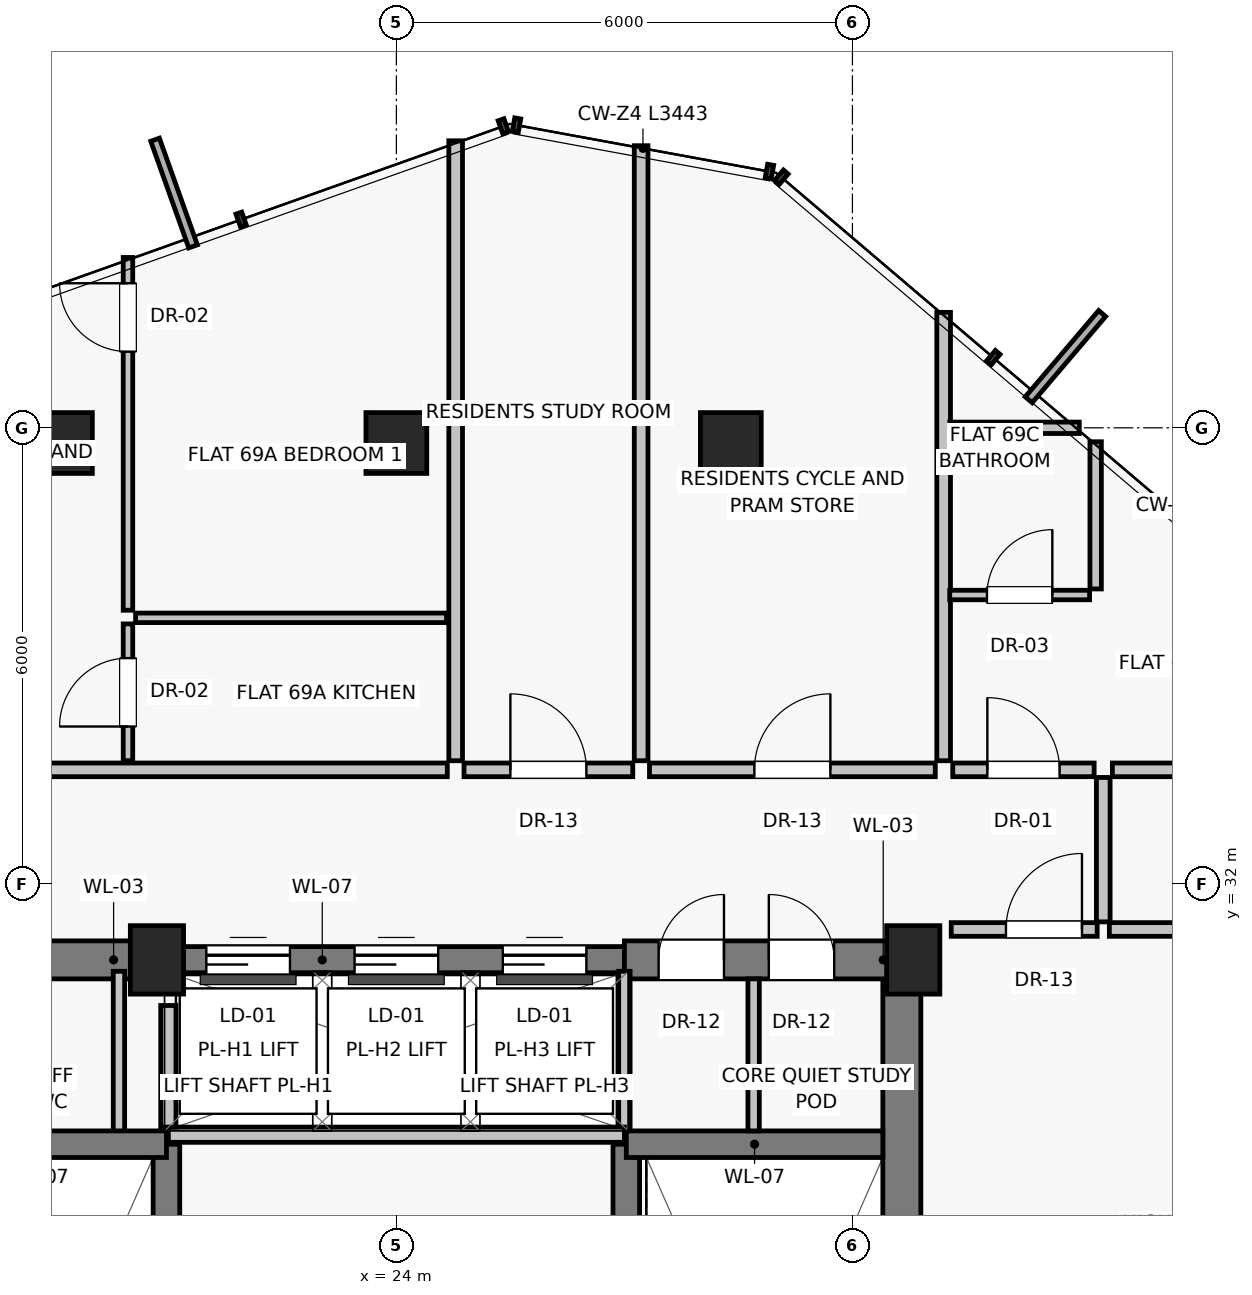
"""IFC4 building model, lengths in metres.
Left out: names, types, materials, properties, quantities, classifications, styles, units other than length and angle.
Written with IfcOpenShell. Run it as: python <this file> out.ifc"""

import sys

from ifc_helpers import new_model, si_unit, direction, frame, frame_2d, origin, origin_2d, place, context, subcontext, project, spatial, rectangle, extrude, source, transform, mapped, element, fill, save


model = new_model("IFC4")
c1 = context("Model", 3, precision=1e-05, world=origin(), true_north=direction((0.0, 1.0)))
c2 = subcontext(c1, "Body", "Model", "MODEL_VIEW")
j1 = project(units=[si_unit("LENGTHUNIT", "METRE"), si_unit("PLANEANGLEUNIT", "RADIAN")], contexts=[c1])
p1 = place(None, origin())
s1 = spatial("IfcSite", under=j1, at=p1, CompositionType="ELEMENT")
p2 = place(p1, origin())
s2 = spatial("IfcBuilding", under=s1, at=p2, CompositionType="ELEMENT")
p3 = place(p2, frame((0.0, 0.0, 244.75)))
s3 = spatial("IfcBuildingStorey", under=s2, at=p3, CompositionType="ELEMENT", Elevation=244.75)
for number, where, z_axis, x_axis in (
    (1, (20.85, 31.0, 0.0), (0.0, 0.0, 1.0), (1.0, 0.0, 0.0)),
    (2, (30.8, 31.0, 0.0), (0.0, 0.0, 1.0), (1.0, 0.0, 0.0)),
):
    element("IfcColumn", number, at=place(p3, frame(where, z_axis=z_axis, x_axis=x_axis)), inside=s3, PredefinedType="PILASTER", context=c2, shape_type="SweptSolid", body=[
        extrude(rectangle(XDim=0.7, YDim=0.9, at=origin_2d()), origin(), (0.0, 0.0, 1.0), 3.25),
    ])
for number, where, z_axis, x_axis in (
    (3, (28.4, 37.8, 0.0), (0.0, 0.0, 1.0), (1.0, 0.0, 0.0)),
    (4, (24.0, 37.8, 0.0), (0.0, 0.0, 1.0), (1.0, 0.0, 0.0)),
    (5, (19.6, 37.8, 0.0), (0.0, 0.0, 1.0), (1.0, 0.0, 0.0)),
):
    element("IfcColumn", number, at=place(p3, frame(where, z_axis=z_axis, x_axis=x_axis)), inside=s3, PredefinedType="COLUMN", context=c2, shape_type="SweptSolid", body=[
        extrude(rectangle(XDim=0.8, YDim=0.8, at=origin_2d()), origin(), (0.0, 0.0, 1.0), 3.25),
    ])
p4 = place(p3, frame((30.65, 16.8, 0.0), z_axis=(0.0, 0.0, 1.0), x_axis=(0.0, 1.0, 0.0)))
e6 = element("IfcWall", 6, at=p4, inside=s3, PredefinedType="SHEAR", context=c2, shape_type="SweptSolid", body=[
    extrude(rectangle(XDim=14.2, YDim=0.5, at=frame_2d((7.1, 0.0))), origin(), (0.0, 0.0, 1.0), 3.015),
])
p5 = place(p3, frame((17.2, 31.0, 0.0), z_axis=(0.0, 0.0, 1.0), x_axis=(1.0, 0.0, 0.0)))
e7 = element("IfcWall", 7, at=p5, inside=s3, PredefinedType="SHEAR", context=c2, shape_type="SweptSolid", body=[
    extrude(rectangle(XDim=3.8, YDim=0.5, at=frame_2d((1.9, 0.0))), origin(), (0.0, 0.0, 1.0), 3.015),
])
p6 = place(p5, frame((1.25, 0.0, 0.0)))
e8 = element("IfcOpeningElement", 8, at=p6, cuts=e7, PredefinedType="OPENING", context=c2, shape_type="SweptSolid", body=[
    extrude(rectangle(XDim=0.86, YDim=2.01, at=frame_2d((0.43, 1.005))), frame((0.0, 0.26, 0.0), z_axis=(0.0, -1.0, 0.0), x_axis=(1.0, 0.0, 0.0)), (0.0, 0.0, 1.0), 0.52),
])
p7 = place(p3, frame((21.0, 31.0, 0.0), z_axis=(0.0, 0.0, 1.0), x_axis=(1.0, 0.0, 0.0)))
e9 = element("IfcWall", 9, at=p7, inside=s3, PredefinedType="SHEAR", context=c2, shape_type="SweptSolid", body=[
    extrude(rectangle(XDim=6.0, YDim=0.35, at=frame_2d((3.0, 0.0))), origin(), (0.0, 0.0, 1.0), 3.015),
])
p8 = place(p7, frame((0.5, 0.0, 0.0)))
e10 = element("IfcOpeningElement", 10, at=p8, cuts=e9, PredefinedType="OPENING", context=c2, shape_type="SweptSolid", body=[
    extrude(rectangle(XDim=1.1, YDim=2.08, at=frame_2d((0.55, 1.04))), frame((0.0, 0.185, 0.0), z_axis=(0.0, -1.0, 0.0), x_axis=(1.0, 0.0, 0.0)), (0.0, 0.0, 1.0), 0.37),
])
p9 = place(p7, frame((2.45, 0.0, 0.0)))
e11 = element("IfcOpeningElement", 11, at=p9, cuts=e9, PredefinedType="OPENING", context=c2, shape_type="SweptSolid", body=[
    extrude(rectangle(XDim=1.1, YDim=2.08, at=frame_2d((0.55, 1.04))), frame((0.0, 0.185, 0.0), z_axis=(0.0, -1.0, 0.0), x_axis=(1.0, 0.0, 0.0)), (0.0, 0.0, 1.0), 0.37),
])
p10 = place(p7, frame((4.4, 0.0, 0.0)))
e12 = element("IfcOpeningElement", 12, at=p10, cuts=e9, PredefinedType="OPENING", context=c2, shape_type="SweptSolid", body=[
    extrude(rectangle(XDim=1.1, YDim=2.08, at=frame_2d((0.55, 1.04))), frame((0.0, 0.185, 0.0), z_axis=(0.0, -1.0, 0.0), x_axis=(1.0, 0.0, 0.0)), (0.0, 0.0, 1.0), 0.37),
])
p11 = place(p3, frame((27.0, 31.0, 0.0), z_axis=(0.0, 0.0, 1.0), x_axis=(1.0, 0.0, 0.0)))
e13 = element("IfcWall", 13, at=p11, inside=s3, PredefinedType="SHEAR", context=c2, shape_type="SweptSolid", body=[
    extrude(rectangle(XDim=3.8, YDim=0.5, at=frame_2d((1.9, 0.0))), origin(), (0.0, 0.0, 1.0), 3.015),
])
p12 = place(p11, frame((0.45, 0.0, 0.0)))
e14 = element("IfcOpeningElement", 14, at=p12, cuts=e13, PredefinedType="OPENING", context=c2, shape_type="SweptSolid", body=[
    extrude(rectangle(XDim=0.86, YDim=2.01, at=frame_2d((0.43, 1.005))), frame((0.0, 0.26, 0.0), z_axis=(0.0, -1.0, 0.0), x_axis=(1.0, 0.0, 0.0)), (0.0, 0.0, 1.0), 0.52),
])
p13 = place(p11, frame((1.9, 0.0, 0.0)))
e15 = element("IfcOpeningElement", 15, at=p13, cuts=e13, PredefinedType="OPENING", context=c2, shape_type="SweptSolid", body=[
    extrude(rectangle(XDim=0.86, YDim=2.01, at=frame_2d((0.43, 1.005))), frame((0.0, 0.26, 0.0), z_axis=(0.0, -1.0, 0.0), x_axis=(1.0, 0.0, 0.0)), (0.0, 0.0, 1.0), 0.52),
])
for number, where, z_axis, x_axis in (
    (16, (20.35, 28.65, 0.0), (0.0, 0.0, 1.0), (0.0, 1.0, 0.0)),
    (17, (27.0, 28.65, 0.0), (0.0, 0.0, 1.0), (0.0, 1.0, 0.0)),
):
    element("IfcWall", number, at=place(p3, frame(where, z_axis=z_axis, x_axis=x_axis)), inside=s3, PredefinedType="PARTITIONING", context=c2, shape_type="SweptSolid", body=[
        extrude(rectangle(XDim=2.2, YDim=0.15, at=frame_2d((1.1, 0.0))), origin(), (0.0, 0.0, 1.0), 3.015),
    ])
for number, where, z_axis, x_axis in (
    (18, (20.975, 19.8, 0.0), (0.0, 0.0, 1.0), (0.0, 1.0, 0.0)),
    (19, (27.025, 19.8, 0.0), (0.0, 0.0, 1.0), (0.0, 1.0, 0.0)),
):
    element("IfcWall", number, at=place(p3, frame(where, z_axis=z_axis, x_axis=x_axis)), inside=s3, PredefinedType="SHEAR", context=c2, shape_type="SweptSolid", body=[
        extrude(rectangle(XDim=8.775, YDim=0.35, at=frame_2d((4.387, 0.0))), origin(), (0.0, 0.0, 1.0), 3.015),
    ])
for number, where, z_axis, x_axis in (
    (20, (17.6, 28.575, 0.0), (0.0, 0.0, 1.0), (1.0, 0.0, 0.0)),
    (21, (27.025, 28.575, 0.0), (0.0, 0.0, 1.0), (1.0, 0.0, 0.0)),
):
    element("IfcWall", number, at=place(p3, frame(where, z_axis=z_axis, x_axis=x_axis)), inside=s3, PredefinedType="SHEAR", context=c2, shape_type="SweptSolid", body=[
        extrude(rectangle(XDim=3.375, YDim=0.35, at=frame_2d((1.688, 0.0))), origin(), (0.0, 0.0, 1.0), 3.015),
    ])
p14 = place(p3, frame((21.0, 28.7, 0.0), z_axis=(0.0, 0.0, 1.0), x_axis=(1.0, 0.0, 0.0)))
e22 = element("IfcWall", 22, at=p14, inside=s3, PredefinedType="SOLIDWALL", context=c2, shape_type="SweptSolid", body=[
    extrude(rectangle(XDim=6.0, YDim=0.2, at=frame_2d((3.0, 0.0))), origin(), (0.0, 0.0, 1.0), 3.015),
])
p15 = place(p3, frame((21.0, 28.8, 0.0), z_axis=(0.0, 0.0, 1.0), x_axis=(0.0, 1.0, 0.0)))
e23 = element("IfcWall", 23, at=p15, inside=s3, PredefinedType="SOLIDWALL", context=c2, shape_type="SweptSolid", body=[
    extrude(rectangle(XDim=1.6, YDim=0.2, at=frame_2d((0.8, 0.0))), origin(), (0.0, 0.0, 1.0), 3.015),
])
p16 = place(p3, frame((28.7, 28.75, 0.0), z_axis=(0.0, 0.0, 1.0), x_axis=(0.0, 1.0, 0.0)))
e24 = element("IfcWall", 24, at=p16, inside=s3, PredefinedType="PARTITIONING", context=c2, shape_type="SweptSolid", body=[
    extrude(rectangle(XDim=2.0, YDim=0.15, at=frame_2d((1.0, 0.0))), origin(), (0.0, 0.0, 1.0), 3.015),
])
p17 = place(p3, frame((31.2, 33.62, 0.0), z_axis=(0.0, 0.0, 1.0), x_axis=(0.0, 1.0, 0.0)))
e25 = element("IfcWall", 25, at=p17, inside=s3, PredefinedType="PARTITIONING", context=c2, shape_type="SweptSolid", body=[
    extrude(rectangle(XDim=5.898, YDim=0.18, at=frame_2d((2.949, 0.0))), origin(), (0.0, 0.0, 1.0), 3.015),
])
p18 = place(p3, frame((15.31, 33.5, 0.0), z_axis=(0.0, 0.0, 1.0), x_axis=(1.0, 0.0, 0.0)))
e26 = element("IfcWall", 26, at=p18, inside=s3, PredefinedType="PARTITIONING", context=c2, shape_type="SweptSolid", body=[
    extrude(rectangle(XDim=9.36, YDim=0.18, at=frame_2d((4.68, 0.0))), origin(), (0.0, 0.0, 1.0), 3.015),
])
p19 = place(p18, frame((3.175, 0.0, 0.0)))
e27 = element("IfcOpeningElement", 27, at=p19, cuts=e26, PredefinedType="OPENING", context=c2, shape_type="SweptSolid", body=[
    extrude(rectangle(XDim=0.95, YDim=2.02, at=frame_2d((0.475, 1.01))), frame((0.0, 0.1, 0.0), z_axis=(0.0, -1.0, 0.0), x_axis=(1.0, 0.0, 0.0)), (0.0, 0.0, 1.0), 0.2),
])
p20 = place(p3, frame((20.469, 33.62, 0.0), z_axis=(0.0, 0.0, 1.0), x_axis=(0.0, 1.0, 0.0)))
e28 = element("IfcWall", 28, at=p20, inside=s3, PredefinedType="PARTITIONING", context=c2, shape_type="SweptSolid", body=[
    extrude(rectangle(XDim=1.8, YDim=0.125, at=frame_2d((0.9, 0.0))), origin(), (0.0, 0.0, 1.0), 2.543),
])
p21 = place(p20, frame((0.45, 0.0, 0.0)))
e29 = element("IfcOpeningElement", 29, at=p21, cuts=e28, PredefinedType="OPENING", context=c2, shape_type="SweptSolid", body=[
    extrude(rectangle(XDim=0.9, YDim=2.01, at=frame_2d((0.45, 1.005))), frame((0.0, 0.073, 0.0), z_axis=(0.0, -1.0, 0.0), x_axis=(1.0, 0.0, 0.0)), (0.0, 0.0, 1.0), 0.145),
])
p22 = place(p3, frame((20.569, 35.5, 0.0), z_axis=(0.0, 0.0, 1.0), x_axis=(1.0, 0.0, 0.0)))
e30 = element("IfcWall", 30, at=p22, inside=s3, PredefinedType="PARTITIONING", context=c2, shape_type="SweptSolid", body=[
    extrude(rectangle(XDim=4.091, YDim=0.125, at=frame_2d((2.045, 0.0))), origin(), (0.0, 0.0, 1.0), 3.015),
])
p23 = place(p3, frame((20.469, 35.6, 0.0), z_axis=(0.0, 0.0, 1.0), x_axis=(0.0, 1.0, 0.0)))
e31 = element("IfcWall", 31, at=p23, inside=s3, PredefinedType="PARTITIONING", context=c2, shape_type="SweptSolid", body=[
    extrude(rectangle(XDim=4.641, YDim=0.125, at=frame_2d((2.32, 0.0))), origin(), (0.0, 0.0, 1.0), 2.543),
])
p24 = place(p23, frame((3.402, 0.0, 0.0)))
e32 = element("IfcOpeningElement", 32, at=p24, cuts=e31, PredefinedType="OPENING", context=c2, shape_type="SweptSolid", body=[
    extrude(rectangle(XDim=0.9, YDim=2.01, at=frame_2d((0.45, 1.005))), frame((0.0, 0.073, 0.0), z_axis=(0.0, -1.0, 0.0), x_axis=(1.0, 0.0, 0.0)), (0.0, 0.0, 1.0), 0.145),
])
p25 = place(p3, frame((24.78, 33.62, 0.0), z_axis=(0.0, 0.0, 1.0), x_axis=(0.0, 1.0, 0.0)))
e33 = element("IfcWall", 33, at=p25, inside=s3, PredefinedType="PARTITIONING", context=c2, shape_type="SweptSolid", body=[
    extrude(rectangle(XDim=8.156, YDim=0.18, at=frame_2d((4.078, 0.0))), origin(), (0.0, 0.0, 1.0), 3.015),
])
p26 = place(p3, frame((24.89, 33.5, 0.0), z_axis=(0.0, 0.0, 1.0), x_axis=(1.0, 0.0, 0.0)))
e34 = element("IfcWall", 34, at=p26, inside=s3, PredefinedType="PARTITIONING", context=c2, shape_type="SweptSolid", body=[
    extrude(rectangle(XDim=2.22, YDim=0.18, at=frame_2d((1.11, 0.0))), origin(), (0.0, 0.0, 1.0), 3.015),
])
p27 = place(p26, frame((0.61, 0.0, 0.0)))
e35 = element("IfcOpeningElement", 35, at=p27, cuts=e34, PredefinedType="OPENING", context=c2, shape_type="SweptSolid", body=[
    extrude(rectangle(XDim=1.0, YDim=2.01, at=frame_2d((0.5, 1.005))), frame((0.0, 0.1, 0.0), z_axis=(0.0, -1.0, 0.0), x_axis=(1.0, 0.0, 0.0)), (0.0, 0.0, 1.0), 0.2),
])
p28 = place(p3, frame((27.33, 33.5, 0.0), z_axis=(0.0, 0.0, 1.0), x_axis=(1.0, 0.0, 0.0)))
e36 = element("IfcWall", 36, at=p28, inside=s3, PredefinedType="PARTITIONING", context=c2, shape_type="SweptSolid", body=[
    extrude(rectangle(XDim=3.76, YDim=0.18, at=frame_2d((1.88, 0.0))), origin(), (0.0, 0.0, 1.0), 3.015),
])
p29 = place(p28, frame((1.38, 0.0, 0.0)))
e37 = element("IfcOpeningElement", 37, at=p29, cuts=e36, PredefinedType="OPENING", context=c2, shape_type="SweptSolid", body=[
    extrude(rectangle(XDim=1.0, YDim=2.01, at=frame_2d((0.5, 1.005))), frame((0.0, 0.1, 0.0), z_axis=(0.0, -1.0, 0.0), x_axis=(1.0, 0.0, 0.0)), (0.0, 0.0, 1.0), 0.2),
])
p30 = place(p3, frame((27.22, 33.62, 0.0), z_axis=(0.0, 0.0, 1.0), x_axis=(0.0, 1.0, 0.0)))
e38 = element("IfcWall", 38, at=p30, inside=s3, PredefinedType="PARTITIONING", context=c2, shape_type="SweptSolid", body=[
    extrude(rectangle(XDim=8.091, YDim=0.18, at=frame_2d((4.045, 0.0))), origin(), (0.0, 0.0, 1.0), 3.015),
])
p31 = place(p3, frame((33.3, 31.5, 0.0), z_axis=(0.0, 0.0, 1.0), x_axis=(0.0, 1.0, 0.0)))
e39 = element("IfcWall", 39, at=p31, inside=s3, PredefinedType="PARTITIONING", context=c2, shape_type="SweptSolid", body=[
    extrude(rectangle(XDim=1.9, YDim=0.18, at=frame_2d((0.95, 0.0))), origin(), (0.0, 0.0, 1.0), 3.015),
])
p32 = place(p3, frame((31.3, 31.4, 0.0), z_axis=(0.0, 0.0, 1.0), x_axis=(1.0, 0.0, 0.0)))
e40 = element("IfcWall", 40, at=p32, inside=s3, PredefinedType="PARTITIONING", context=c2, shape_type="SweptSolid", body=[
    extrude(rectangle(XDim=1.92, YDim=0.18, at=frame_2d((0.96, 0.0))), origin(), (0.0, 0.0, 1.0), 3.015),
])
p33 = place(p32, frame((0.72, 0.0, 0.0)))
e41 = element("IfcOpeningElement", 41, at=p33, cuts=e40, PredefinedType="OPENING", context=c2, shape_type="SweptSolid", body=[
    extrude(rectangle(XDim=1.0, YDim=2.01, at=frame_2d((0.5, 1.005))), frame((0.0, 0.1, 0.0), z_axis=(0.0, -1.0, 0.0), x_axis=(1.0, 0.0, 0.0)), (0.0, 0.0, 1.0), 0.2),
])
p34 = place(p3, frame((33.38, 31.4, 0.0), z_axis=(0.0, 0.0, 1.0), x_axis=(1.0, 0.0, 0.0)))
e42 = element("IfcWall", 42, at=p34, inside=s3, PredefinedType="PARTITIONING", context=c2, shape_type="SweptSolid", body=[
    extrude(rectangle(XDim=7.094, YDim=0.18, at=frame_2d((3.547, 0.0))), origin(), (0.0, 0.0, 1.0), 3.015),
])
p35 = place(p3, frame((33.42, 33.5, 0.0), z_axis=(0.0, 0.0, 1.0), x_axis=(1.0, 0.0, 0.0)))
e43 = element("IfcWall", 43, at=p35, inside=s3, PredefinedType="PARTITIONING", context=c2, shape_type="SweptSolid", body=[
    extrude(rectangle(XDim=4.852, YDim=0.18, at=frame_2d((2.426, 0.0))), origin(), (0.0, 0.0, 1.0), 3.015),
])
p36 = place(p3, frame((31.32, 33.5, 0.0), z_axis=(0.0, 0.0, 1.0), x_axis=(1.0, 0.0, 0.0)))
e44 = element("IfcWall", 44, at=p36, inside=s3, PredefinedType="PARTITIONING", context=c2, shape_type="SweptSolid", body=[
    extrude(rectangle(XDim=1.86, YDim=0.18, at=frame_2d((0.93, 0.0))), origin(), (0.0, 0.0, 1.0), 3.015),
])
p37 = place(p36, frame((0.455, 0.0, 0.0)))
e45 = element("IfcOpeningElement", 45, at=p37, cuts=e44, PredefinedType="OPENING", context=c2, shape_type="SweptSolid", body=[
    extrude(rectangle(XDim=0.95, YDim=2.02, at=frame_2d((0.475, 1.01))), frame((0.0, 0.1, 0.0), z_axis=(0.0, -1.0, 0.0), x_axis=(1.0, 0.0, 0.0)), (0.0, 0.0, 1.0), 0.2),
])
p38 = place(p3, frame((31.28, 35.8, 0.0), z_axis=(0.0, 0.0, 1.0), x_axis=(1.0, 0.0, 0.0)))
e46 = element("IfcWall", 46, at=p38, inside=s3, PredefinedType="PARTITIONING", context=c2, shape_type="SweptSolid", body=[
    extrude(rectangle(XDim=1.84, YDim=0.125, at=frame_2d((0.92, 0.0))), origin(), (0.0, 0.0, 1.0), 3.015),
])
p39 = place(p38, frame((0.49, 0.0, 0.0)))
e47 = element("IfcOpeningElement", 47, at=p39, cuts=e46, PredefinedType="OPENING", context=c2, shape_type="SweptSolid", body=[
    extrude(rectangle(XDim=0.86, YDim=2.01, at=frame_2d((0.43, 1.005))), frame((0.0, 0.073, 0.0), z_axis=(0.0, -1.0, 0.0), x_axis=(1.0, 0.0, 0.0)), (0.0, 0.0, 1.0), 0.145),
])
p40 = place(p3, frame((31.28, 38.0, 0.0), z_axis=(0.0, 0.0, 1.0), x_axis=(1.0, 0.0, 0.0)))
e48 = element("IfcWall", 48, at=p40, inside=s3, PredefinedType="PARTITIONING", context=c2, shape_type="SweptSolid", body=[
    extrude(rectangle(XDim=1.704, YDim=0.15, at=frame_2d((0.852, 0.0))), origin(), (0.0, 0.0, 1.0), 3.015),
])
p41 = place(p3, frame((33.2, 35.88, 0.0), z_axis=(0.0, 0.0, 1.0), x_axis=(0.0, 1.0, 0.0)))
e49 = element("IfcWall", 49, at=p41, inside=s3, PredefinedType="PARTITIONING", context=c2, shape_type="SweptSolid", body=[
    extrude(rectangle(XDim=1.937, YDim=0.15, at=frame_2d((0.968, 0.0))), origin(), (0.0, 0.0, 1.0), 3.015),
])
m1 = source(origin(), c2, "Body", "SweptSolid", [
    extrude(rectangle(XDim=1.1, YDim=2.08, at=frame_2d((0.55, 1.04))), frame((0.0, 0.025, 0.0), z_axis=(0.0, -1.0, 0.0), x_axis=(1.0, 0.0, 0.0)), (0.0, 0.0, 1.0), 0.05),
])
p42 = place(p8, origin())
e50 = element("IfcDoor", 50, at=p42, inside=s3, OperationType="SLIDING_TO_LEFT", PredefinedType="DOOR", context=c2, shape_type="MappedRepresentation", body=[
    mapped(m1, transform((0.0, 0.0, 0.0), scale=1.0)),
])
fill(e10, e50)
p43 = place(p9, origin())
e51 = element("IfcDoor", 51, at=p43, inside=s3, OperationType="SLIDING_TO_LEFT", PredefinedType="DOOR", context=c2, shape_type="MappedRepresentation", body=[
    mapped(m1, transform((0.0, 0.0, 0.0), scale=1.0)),
])
fill(e11, e51)
p44 = place(p10, origin())
e52 = element("IfcDoor", 52, at=p44, inside=s3, OperationType="SLIDING_TO_LEFT", PredefinedType="DOOR", context=c2, shape_type="MappedRepresentation", body=[
    mapped(m1, transform((0.0, 0.0, 0.0), scale=1.0)),
])
fill(e12, e52)
m2 = source(origin(), c2, "Body", "SweptSolid", [
    extrude(rectangle(XDim=0.86, YDim=2.01, at=frame_2d((0.43, 1.005))), frame((0.0, 0.025, 0.0), z_axis=(0.0, -1.0, 0.0), x_axis=(1.0, 0.0, 0.0)), (0.0, 0.0, 1.0), 0.05),
])
p45 = place(p12, origin())
e53 = element("IfcDoor", 53, at=p45, inside=s3, OperationType="SINGLE_SWING_RIGHT", PredefinedType="DOOR", context=c2, shape_type="MappedRepresentation", body=[
    mapped(m2, transform((0.0, 0.0, 0.0), scale=1.0)),
])
fill(e14, e53)
p46 = place(p13, origin())
e54 = element("IfcDoor", 54, at=p46, inside=s3, OperationType="SINGLE_SWING_LEFT", PredefinedType="DOOR", context=c2, shape_type="MappedRepresentation", body=[
    mapped(m2, transform((0.0, 0.0, 0.0), scale=1.0)),
])
fill(e15, e54)
m3 = source(origin(), c2, "Body", "SweptSolid", [
    extrude(rectangle(XDim=0.9, YDim=2.01, at=frame_2d((0.45, 1.005))), frame((0.0, 0.025, 0.0), z_axis=(0.0, -1.0, 0.0), x_axis=(1.0, 0.0, 0.0)), (0.0, 0.0, 1.0), 0.05),
])
p47 = place(p21, origin())
e55 = element("IfcDoor", 55, at=p47, inside=s3, OperationType="SINGLE_SWING_LEFT", PredefinedType="DOOR", context=c2, shape_type="MappedRepresentation", body=[
    mapped(m3, transform((0.0, 0.0, 0.0), scale=1.0)),
])
fill(e29, e55)
p48 = place(p24, origin())
e56 = element("IfcDoor", 56, at=p48, inside=s3, OperationType="SINGLE_SWING_RIGHT", PredefinedType="DOOR", context=c2, shape_type="MappedRepresentation", body=[
    mapped(m3, transform((0.0, 0.0, 0.0), scale=1.0)),
])
fill(e32, e56)
m4 = source(origin(), c2, "Body", "SweptSolid", [
    extrude(rectangle(XDim=1.0, YDim=2.01, at=frame_2d((0.5, 1.005))), frame((0.0, 0.025, 0.0), z_axis=(0.0, -1.0, 0.0), x_axis=(1.0, 0.0, 0.0)), (0.0, 0.0, 1.0), 0.05),
])
p49 = place(p27, origin())
e57 = element("IfcDoor", 57, at=p49, inside=s3, OperationType="SINGLE_SWING_LEFT", PredefinedType="DOOR", context=c2, shape_type="MappedRepresentation", body=[
    mapped(m4, transform((0.0, 0.0, 0.0), scale=1.0)),
])
fill(e35, e57)
p50 = place(p29, origin())
e58 = element("IfcDoor", 58, at=p50, inside=s3, OperationType="SINGLE_SWING_RIGHT", PredefinedType="DOOR", context=c2, shape_type="MappedRepresentation", body=[
    mapped(m4, transform((0.0, 0.0, 0.0), scale=1.0)),
])
fill(e37, e58)
p51 = place(p33, origin())
e59 = element("IfcDoor", 59, at=p51, inside=s3, OperationType="SINGLE_SWING_RIGHT", PredefinedType="DOOR", context=c2, shape_type="MappedRepresentation", body=[
    mapped(m4, transform((0.0, 0.0, 0.0), scale=1.0)),
])
fill(e41, e59)
m5 = source(origin(), c2, "Body", "SweptSolid", [
    extrude(rectangle(XDim=0.95, YDim=2.02, at=frame_2d((0.475, 1.01))), frame((0.0, 0.025, 0.0), z_axis=(0.0, -1.0, 0.0), x_axis=(1.0, 0.0, 0.0)), (0.0, 0.0, 1.0), 0.05),
])
p52 = place(p37, origin())
e60 = element("IfcDoor", 60, at=p52, inside=s3, OperationType="SINGLE_SWING_LEFT", PredefinedType="DOOR", context=c2, shape_type="MappedRepresentation", body=[
    mapped(m5, transform((0.0, 0.0, 0.0), scale=1.0)),
])
fill(e45, e60)
p53 = place(p39, origin())
e61 = element("IfcDoor", 61, at=p53, inside=s3, OperationType="SINGLE_SWING_RIGHT", PredefinedType="DOOR", context=c2, shape_type="MappedRepresentation", body=[
    mapped(m2, transform((0.0, 0.0, 0.0), scale=1.0)),
])
fill(e47, e61)
save(model, sys.argv[1])
